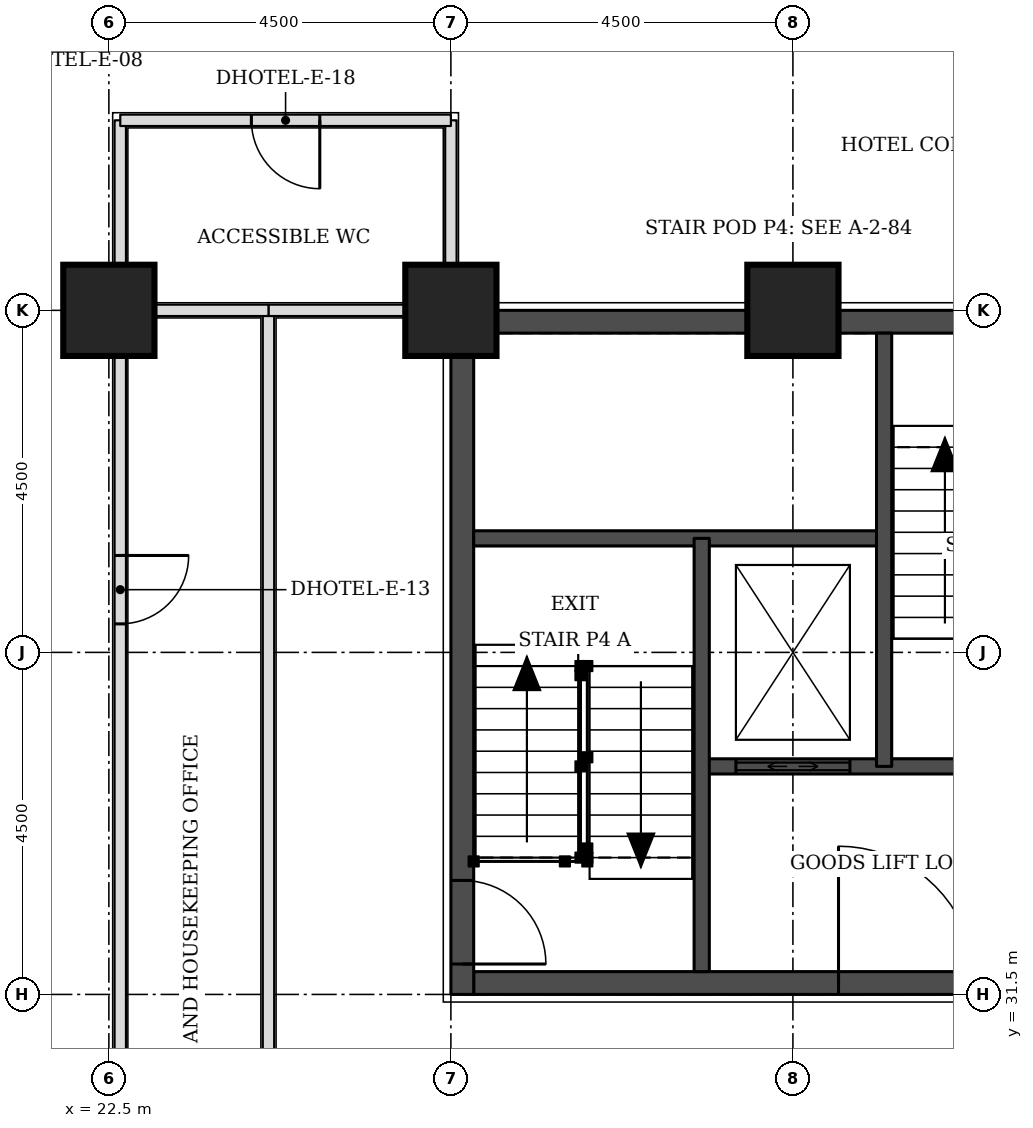
"""IFC4 building model, lengths in metres.
Left out: names, types, materials, properties, quantities, classifications, styles, units other than length and angle.
Written with IfcOpenShell. Run it as: python <this file> out.ifc"""

import sys

from ifc_helpers import new_model, si_unit, direction, frame, frame_2d, origin, origin_2d, place, context, subcontext, project, spatial, rectangle, extrude, element, fill, save


model = new_model("IFC4")
c1 = context("Model", 3, precision=1e-05, world=origin(), true_north=direction((0.0, 1.0)))
c2 = subcontext(c1, "Body", "Model", "MODEL_VIEW")
j1 = project(units=[si_unit("LENGTHUNIT", "METRE"), si_unit("PLANEANGLEUNIT", "RADIAN")], contexts=[c1])
p1 = place(None, origin())
s1 = spatial("IfcSite", under=j1, at=p1, CompositionType="ELEMENT")
p2 = place(p1, origin())
s2 = spatial("IfcBuilding", under=s1, at=p2, CompositionType="ELEMENT")
p3 = place(p2, frame((0.0, 0.0, 62.7)))
s3 = spatial("IfcBuildingStorey", under=s2, at=p3, CompositionType="ELEMENT", Elevation=62.7)
for number, where, z_axis, x_axis in (
    (1, (22.5, 40.5, 0.0), (0.0, 0.0, 1.0), (1.0, 0.0, 0.0)),
    (2, (27.0, 40.5, 0.0), (0.0, 0.0, 1.0), (1.0, 0.0, 0.0)),
    (3, (31.5, 40.5, 0.0), (0.0, 0.0, 1.0), (1.0, 0.0, 0.0)),
):
    element("IfcColumn", number, at=place(p3, frame(where, z_axis=z_axis, x_axis=x_axis)), inside=s3, PredefinedType="COLUMN", context=c2, shape_type="SweptSolid", body=[
        extrude(rectangle(XDim=1.2, YDim=1.2, at=origin_2d()), origin(), (0.0, 0.0, 1.0), 3.3),
    ])
p4 = place(p3, frame((27.3, 31.65, 0.0), z_axis=(0.0, 0.0, 1.0), x_axis=(1.0, 0.0, 0.0)))
e4 = element("IfcWall", 4, at=p4, inside=s3, PredefinedType="SHEAR", context=c2, shape_type="SweptSolid", body=[
    extrude(rectangle(XDim=8.4, YDim=0.3, at=frame_2d((4.2, 0.0))), origin(), (0.0, 0.0, 1.0), 3.3),
])
p5 = place(p4, frame((4.8, 0.0, 0.0)))
e5 = element("IfcOpeningElement", 5, at=p5, cuts=e4, PredefinedType="OPENING", context=c2, shape_type="SweptSolid", body=[
    extrude(rectangle(XDim=1.8, YDim=2.1, at=frame_2d((0.9, 1.05))), frame((0.0, 0.16, 0.0), z_axis=(0.0, -1.0, 0.0), x_axis=(1.0, 0.0, 0.0)), (0.0, 0.0, 1.0), 0.32),
])
p6 = place(p3, frame((27.3, 40.35, 0.0), z_axis=(0.0, 0.0, 1.0), x_axis=(1.0, 0.0, 0.0)))
e6 = element("IfcWall", 6, at=p6, inside=s3, PredefinedType="SHEAR", context=c2, shape_type="SweptSolid", body=[
    extrude(rectangle(XDim=8.4, YDim=0.3, at=frame_2d((4.2, 0.0))), origin(), (0.0, 0.0, 1.0), 3.3),
])
p7 = place(p6, frame((6.4, 0.0, 0.0)))
e7 = element("IfcOpeningElement", 7, at=p7, cuts=e6, PredefinedType="OPENING", context=c2, shape_type="SweptSolid", body=[
    extrude(rectangle(XDim=1.1, YDim=2.1, at=frame_2d((0.55, 1.05))), frame((0.0, 0.16, 0.0), z_axis=(0.0, -1.0, 0.0), x_axis=(1.0, 0.0, 0.0)), (0.0, 0.0, 1.0), 0.32),
])
p8 = place(p3, frame((27.15, 31.5, 0.0), z_axis=(0.0, 0.0, 1.0), x_axis=(0.0, 1.0, 0.0)))
e8 = element("IfcWall", 8, at=p8, inside=s3, PredefinedType="SHEAR", context=c2, shape_type="SweptSolid", body=[
    extrude(rectangle(XDim=9.0, YDim=0.3, at=frame_2d((4.5, 0.0))), origin(), (0.0, 0.0, 1.0), 3.3),
])
p9 = place(p8, frame((0.4, 0.0, 0.0)))
e9 = element("IfcOpeningElement", 9, at=p9, cuts=e8, PredefinedType="OPENING", context=c2, shape_type="SweptSolid", body=[
    extrude(rectangle(XDim=1.1, YDim=2.1, at=frame_2d((0.55, 1.05))), frame((0.0, 0.16, 0.0), z_axis=(0.0, -1.0, 0.0), x_axis=(1.0, 0.0, 0.0)), (0.0, 0.0, 1.0), 0.32),
])
p10 = place(p3, frame((22.65, 27.15, 0.0), z_axis=(0.0, 0.0, 1.0), x_axis=(0.0, 1.0, 0.0)))
e10 = element("IfcWall", 10, at=p10, inside=s3, PredefinedType="PARTITIONING", context=c2, shape_type="SweptSolid", body=[
    extrude(rectangle(XDim=15.85, YDim=0.15, at=frame_2d((7.925, 0.0))), origin(), (0.0, 0.0, 1.0), 3.08),
])
p11 = place(p10, frame((9.225, 0.0, 0.0)))
e11 = element("IfcOpeningElement", 11, at=p11, cuts=e10, PredefinedType="OPENING", context=c2, shape_type="SweptSolid", body=[
    extrude(rectangle(XDim=0.9, YDim=2.1, at=frame_2d((0.45, 1.05))), frame((0.0, 0.085, 0.0), z_axis=(0.0, -1.0, 0.0), x_axis=(1.0, 0.0, 0.0)), (0.0, 0.0, 1.0), 0.17),
])
p12 = place(p3, frame((24.6, 27.15, 0.0), z_axis=(0.0, 0.0, 1.0), x_axis=(0.0, 1.0, 0.0)))
e12 = element("IfcWall", 12, at=p12, inside=s3, PredefinedType="PARTITIONING", context=c2, shape_type="SweptSolid", body=[
    extrude(rectangle(XDim=13.35, YDim=0.15, at=frame_2d((6.675, 0.0))), origin(), (0.0, 0.0, 1.0), 3.08),
])
p13 = place(p3, frame((24.6, 40.5, 0.0), z_axis=(0.0, 0.0, 1.0), x_axis=(1.0, 0.0, 0.0)))
e13 = element("IfcWall", 13, at=p13, inside=s3, PredefinedType="PARTITIONING", context=c2, shape_type="SweptSolid", body=[
    extrude(rectangle(XDim=2.35, YDim=0.15, at=frame_2d((1.175, 0.0))), origin(), (0.0, 0.0, 1.0), 2.33),
])
p14 = place(p3, frame((27.0, 40.55, 0.0), z_axis=(0.0, 0.0, 1.0), x_axis=(0.0, 1.0, 0.0)))
e14 = element("IfcWall", 14, at=p14, inside=s3, PredefinedType="PARTITIONING", context=c2, shape_type="SweptSolid", body=[
    extrude(rectangle(XDim=2.45, YDim=0.15, at=frame_2d((1.225, 0.0))), origin(), (0.0, 0.0, 1.0), 3.08),
])
p15 = place(p3, frame((22.65, 43.0, 0.0), z_axis=(0.0, 0.0, 1.0), x_axis=(1.0, 0.0, 0.0)))
e15 = element("IfcWall", 15, at=p15, inside=s3, PredefinedType="PARTITIONING", context=c2, shape_type="SweptSolid", body=[
    extrude(rectangle(XDim=4.35, YDim=0.15, at=frame_2d((2.175, 0.0))), origin(), (0.0, 0.0, 1.0), 3.08),
])
p16 = place(p15, frame((1.725, 0.0, 0.0)))
e16 = element("IfcOpeningElement", 16, at=p16, cuts=e15, PredefinedType="OPENING", context=c2, shape_type="SweptSolid", body=[
    extrude(rectangle(XDim=0.9, YDim=2.1, at=frame_2d((0.45, 1.05))), frame((0.0, 0.085, 0.0), z_axis=(0.0, -1.0, 0.0), x_axis=(1.0, 0.0, 0.0)), (0.0, 0.0, 1.0), 0.17),
])
p17 = place(p3, frame((22.65, 40.5, 0.0), z_axis=(0.0, 0.0, 1.0), x_axis=(1.0, 0.0, 0.0)))
e17 = element("IfcWall", 17, at=p17, inside=s3, PredefinedType="PARTITIONING", context=c2, shape_type="SweptSolid", body=[
    extrude(rectangle(XDim=1.95, YDim=0.15, at=frame_2d((0.975, 0.0))), origin(), (0.0, 0.0, 1.0), 2.33),
])
p18 = place(p3, frame((30.3, 34.5, 0.0), z_axis=(0.0, 0.0, 1.0), x_axis=(1.0, 0.0, 0.0)))
e18 = element("IfcWall", 18, at=p18, inside=s3, PredefinedType="SOLIDWALL", context=c2, shape_type="SweptSolid", body=[
    extrude(rectangle(XDim=5.4, YDim=0.2, at=frame_2d((2.7, 0.0))), origin(), (0.0, 0.0, 1.0), 3.08),
])
p19 = place(p18, frame((0.45, 0.0, 0.0)))
e19 = element("IfcOpeningElement", 19, at=p19, cuts=e18, PredefinedType="OPENING", context=c2, shape_type="SweptSolid", body=[
    extrude(rectangle(XDim=1.5, YDim=2.1, at=frame_2d((0.75, 1.05))), frame((0.0, 0.11, 0.0), z_axis=(0.0, -1.0, 0.0), x_axis=(1.0, 0.0, 0.0)), (0.0, 0.0, 1.0), 0.22),
])
p20 = place(p3, frame((27.3, 37.5, 0.0), z_axis=(0.0, 0.0, 1.0), x_axis=(1.0, 0.0, 0.0)))
e20 = element("IfcWall", 20, at=p20, inside=s3, PredefinedType="SOLIDWALL", context=c2, shape_type="SweptSolid", body=[
    extrude(rectangle(XDim=5.4, YDim=0.2, at=frame_2d((2.7, 0.0))), origin(), (0.0, 0.0, 1.0), 3.08),
])
for number, where, z_axis, x_axis in (
    (21, (30.3, 31.8, 0.0), (0.0, 0.0, 1.0), (0.0, 1.0, 0.0)),
    (22, (32.7, 34.5, 0.0), (0.0, 0.0, 1.0), (0.0, 1.0, 0.0)),
):
    element("IfcWall", number, at=place(p3, frame(where, z_axis=z_axis, x_axis=x_axis)), inside=s3, PredefinedType="SOLIDWALL", context=c2, shape_type="SweptSolid", body=[
        extrude(rectangle(XDim=5.7, YDim=0.2, at=frame_2d((2.85, 0.0))), origin(), (0.0, 0.0, 1.0), 3.08),
    ])
p21 = place(p11, frame((0.9, 0.0, 0.0), z_axis=(0.0, 0.0, 1.0), x_axis=(-1.0, 0.0, 0.0)))
e23 = element("IfcDoor", 23, at=p21, inside=s3, OperationType="SINGLE_SWING_LEFT", PredefinedType="DOOR", context=c2, shape_type="SweptSolid", body=[
    extrude(rectangle(XDim=0.9, YDim=2.1, at=frame_2d((0.45, 1.05))), frame((0.0, 0.025, 0.0), z_axis=(0.0, -1.0, 0.0), x_axis=(1.0, 0.0, 0.0)), (0.0, 0.0, 1.0), 0.05),
])
fill(e11, e23)
p22 = place(p16, frame((0.9, 0.0, 0.0), z_axis=(0.0, 0.0, 1.0), x_axis=(-1.0, 0.0, 0.0)))
e24 = element("IfcDoor", 24, at=p22, inside=s3, OperationType="SINGLE_SWING_LEFT", PredefinedType="DOOR", context=c2, shape_type="SweptSolid", body=[
    extrude(rectangle(XDim=0.9, YDim=2.1, at=frame_2d((0.45, 1.05))), frame((0.0, 0.025, 0.0), z_axis=(0.0, -1.0, 0.0), x_axis=(1.0, 0.0, 0.0)), (0.0, 0.0, 1.0), 0.05),
])
fill(e16, e24)
p23 = place(p9, frame((1.1, 0.0, 0.0), z_axis=(0.0, 0.0, 1.0), x_axis=(-1.0, 0.0, 0.0)))
e25 = element("IfcDoor", 25, at=p23, inside=s3, OperationType="SINGLE_SWING_RIGHT", PredefinedType="DOOR", context=c2, shape_type="SweptSolid", body=[
    extrude(rectangle(XDim=1.1, YDim=2.1, at=frame_2d((0.55, 1.05))), frame((0.0, 0.025, 0.0), z_axis=(0.0, -1.0, 0.0), x_axis=(1.0, 0.0, 0.0)), (0.0, 0.0, 1.0), 0.05),
])
fill(e9, e25)
p24 = place(p19, origin())
e26 = element("IfcDoor", 26, at=p24, inside=s3, OperationType="DOUBLE_DOOR_SLIDING", PredefinedType="DOOR", context=c2, shape_type="SweptSolid", body=[
    extrude(rectangle(XDim=1.5, YDim=2.1, at=frame_2d((0.75, 1.05))), frame((0.0, 0.025, 0.0), z_axis=(0.0, -1.0, 0.0), x_axis=(1.0, 0.0, 0.0)), (0.0, 0.0, 1.0), 0.05),
])
fill(e19, e26)
p25 = place(p5, origin())
e27 = element("IfcDoor", 27, at=p25, inside=s3, OperationType="SINGLE_SWING_LEFT", PredefinedType="DOOR", context=c2, shape_type="SweptSolid", body=[
    extrude(rectangle(XDim=1.8, YDim=2.1, at=frame_2d((0.9, 1.05))), frame((0.0, 0.025, 0.0), z_axis=(0.0, -1.0, 0.0), x_axis=(1.0, 0.0, 0.0)), (0.0, 0.0, 1.0), 0.05),
])
fill(e5, e27)
save(model, sys.argv[1])
